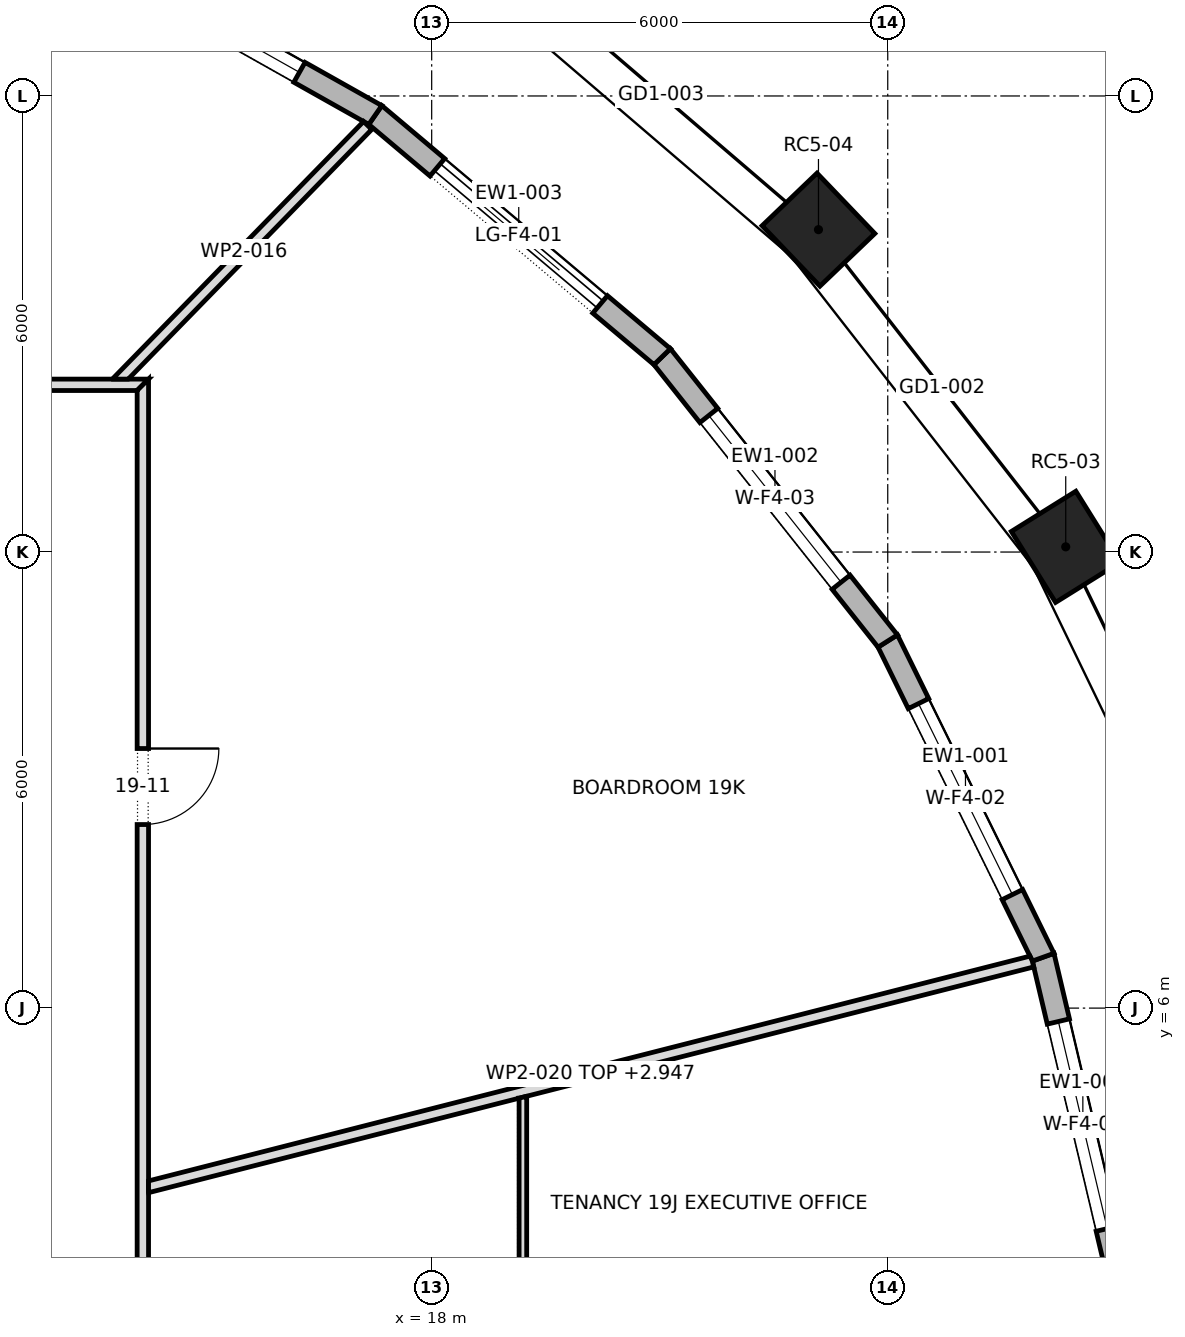
"""IFC4 building model, lengths in metres.
Left out: names, types, materials, properties, quantities, classifications, styles, units other than length and angle.
Written with IfcOpenShell. Run it as: python <this file> out.ifc"""

import sys

from ifc_helpers import new_model, si_unit, direction, frame, frame_2d, origin, origin_2d, place, context, subcontext, project, spatial, polyline, rectangle, outline, extrude, element, fill, save


model = new_model("IFC4")
c1 = context("Model", 3, precision=1e-05, world=origin(), true_north=direction((0.0, 1.0)))
c2 = subcontext(c1, "Body", "Model", "MODEL_VIEW")
j1 = project(units=[si_unit("LENGTHUNIT", "METRE"), si_unit("PLANEANGLEUNIT", "RADIAN")], contexts=[c1])
p1 = place(None, origin())
s1 = spatial("IfcSite", under=j1, at=p1, CompositionType="ELEMENT")
p2 = place(p1, origin())
s2 = spatial("IfcBuilding", under=s1, at=p2, CompositionType="ELEMENT")
p3 = place(p2, frame((0.0, 0.0, 268.3)))
s3 = spatial("IfcBuildingStorey", under=s2, at=p3, CompositionType="ELEMENT", Elevation=268.3)
for number, where, z_axis, x_axis in (
    (1, (26.342, 12.069, 0.0), (0.0, 0.0, 1.0), (-0.529, 0.849, 0.0)),
    (2, (23.089, 16.241, 0.0), (0.0, 0.0, 1.0), (-0.692, 0.722, 0.0)),
):
    element("IfcColumn", number, at=place(p3, frame(where, z_axis=z_axis, x_axis=x_axis)), inside=s3, PredefinedType="COLUMN", context=c2, shape_type="SweptSolid", body=[
        extrude(rectangle(XDim=1.1, YDim=1.0, at=origin_2d()), origin(), (0.0, 0.0, 1.0), 4.0),
    ])
p4 = place(p3, frame((27.088, 2.252, 0.0), z_axis=(0.0, 0.0, 1.0), x_axis=(-0.22983372436, 0.973229910734, 0.0)))
e3 = element("IfcWall", 3, at=p4, inside=s3, PredefinedType="STANDARD", context=c2, shape_type="SweptSolid", body=[
    extrude(outline(polyline([(-0.018, -0.15), (4.556, -0.15), (4.522, 0.15), (0.018, 0.15), (-0.018, -0.15)])), origin(), (0.0, 0.0, 1.0), 3.7),
])
p5 = place(p4, frame((0.869, 0.0, 0.6)))
e4 = element("IfcOpeningElement", 4, at=p5, cuts=e3, PredefinedType="OPENING", context=c2, shape_type="SweptSolid", body=[
    extrude(rectangle(XDim=2.8, YDim=2.65, at=frame_2d((1.4, 1.325))), frame((0.0, 0.162, 0.0), z_axis=(0.0, -1.0, 0.0), x_axis=(1.0, 0.0, 0.0)), (0.0, 0.0, 1.0), 0.324),
])
p6 = place(p3, frame((26.045, 6.67, 0.0), z_axis=(0.0, 0.0, 1.0), x_axis=(-0.441261940724, 0.897378348117, 0.0)))
e5 = element("IfcWall", 5, at=p6, inside=s3, PredefinedType="STANDARD", context=c2, shape_type="SweptSolid", body=[
    extrude(outline(polyline([(-0.017, -0.15), (4.651, -0.15), (4.619, 0.15), (0.017, 0.15), (-0.017, -0.15)])), origin(), (0.0, 0.0, 1.0), 3.7),
])
p7 = place(p6, frame((0.917, 0.0, 0.6)))
e6 = element("IfcOpeningElement", 6, at=p7, cuts=e5, PredefinedType="OPENING", context=c2, shape_type="SweptSolid", body=[
    extrude(rectangle(XDim=2.8, YDim=2.65, at=frame_2d((1.4, 1.325))), frame((0.0, 0.162, 0.0), z_axis=(0.0, -1.0, 0.0), x_axis=(1.0, 0.0, 0.0)), (0.0, 0.0, 1.0), 0.324),
])
p8 = place(p3, frame((24.0, 10.829, 0.0), z_axis=(0.0, 0.0, 1.0), x_axis=(-0.621434755851, 0.783465917715, 0.0)))
e7 = element("IfcWall", 7, at=p8, inside=s3, PredefinedType="STANDARD", context=c2, shape_type="SweptSolid", body=[
    extrude(outline(polyline([(-0.016, -0.15), (4.79, -0.15), (4.76, 0.15), (0.016, 0.15), (-0.016, -0.15)])), origin(), (0.0, 0.0, 1.0), 3.7),
])
p9 = place(p8, frame((0.987, 0.0, 0.6)))
e8 = element("IfcOpeningElement", 8, at=p9, cuts=e7, PredefinedType="OPENING", context=c2, shape_type="SweptSolid", body=[
    extrude(rectangle(XDim=2.8, YDim=2.65, at=frame_2d((1.4, 1.325))), frame((0.0, 0.162, 0.0), z_axis=(0.0, -1.0, 0.0), x_axis=(1.0, 0.0, 0.0)), (0.0, 0.0, 1.0), 0.324),
])
p10 = place(p3, frame((21.032, 14.57, 0.0), z_axis=(0.0, 0.0, 1.0), x_axis=(-0.764832940795, 0.644228664897, 0.0)))
e9 = element("IfcWall", 9, at=p10, inside=s3, PredefinedType="STANDARD", context=c2, shape_type="SweptSolid", body=[
    extrude(outline(polyline([(-0.015, -0.15), (4.949, -0.15), (4.921, 0.15), (0.015, 0.15), (-0.015, -0.15)])), origin(), (0.0, 0.0, 1.0), 3.7),
])
p11 = place(p10, frame((1.068, 0.0, 0.0)))
e10 = element("IfcOpeningElement", 10, at=p11, cuts=e9, PredefinedType="OPENING", context=c2, shape_type="SweptSolid", body=[
    extrude(rectangle(XDim=2.8, YDim=3.25, at=frame_2d((1.4, 1.625))), frame((0.0, 0.162, 0.0), z_axis=(0.0, -1.0, 0.0), x_axis=(1.0, 0.0, 0.0)), (0.0, 0.0, 1.0), 0.324),
])
p12 = place(p3, frame((17.258, 17.75, 0.0), z_axis=(0.0, 0.0, 1.0), x_axis=(-0.871433320402, 0.490513983585, 0.0)))
e11 = element("IfcWall", 11, at=p12, inside=s3, PredefinedType="STANDARD", context=c2, shape_type="SweptSolid", body=[
    extrude(outline(polyline([(-0.014, -0.15), (5.104, -0.15), (5.077, 0.15), (0.014, 0.15), (-0.014, -0.15)])), origin(), (0.0, 0.0, 1.0), 3.7),
])
p13 = place(p12, frame((1.145, 0.0, 0.6)))
e12 = element("IfcOpeningElement", 12, at=p13, cuts=e11, PredefinedType="OPENING", context=c2, shape_type="SweptSolid", body=[
    extrude(rectangle(XDim=2.8, YDim=2.65, at=frame_2d((1.4, 1.325))), frame((0.0, 0.162, 0.0), z_axis=(0.0, -1.0, 0.0), x_axis=(1.0, 0.0, 0.0)), (0.0, 0.0, 1.0), 0.324),
])
p14 = place(p3, frame((-14.275, 14.2, 0.0), z_axis=(0.0, 0.0, 1.0), x_axis=(1.0, 0.0, 0.0)))
e13 = element("IfcWall", 13, at=p14, inside=s3, PredefinedType="PARTITIONING", context=c2, shape_type="SweptSolid", body=[
    extrude(outline(polyline([(0.15, -0.075), (2.033, -0.075), (3.917, -0.075), (5.8, -0.075), (7.683, -0.075), (9.567, -0.075), (11.45, -0.075), (13.333, -0.075), (15.217, -0.075), (17.1, -0.075), (18.983, -0.075), (20.866, -0.075), (22.75, -0.075), (24.633, -0.075), (26.517, -0.075), (28.4, -0.075), (28.55, 0.075), (28.55, 0.075), (26.646, 0.075), (24.743, 0.075), (22.84, 0.075), (20.937, 0.075), (19.033, 0.075), (17.13, 0.075), (15.227, 0.075), (13.323, 0.075), (11.42, 0.075), (9.517, 0.075), (7.613, 0.075), (5.71, 0.075), (3.807, 0.075), (1.903, 0.075), (0.0, 0.075), (0.15, -0.075)])), origin(), (0.0, 0.0, 1.0), 3.7),
])
p15 = place(p14, frame((5.845, 0.0, 0.0)))
e14 = element("IfcOpeningElement", 14, at=p15, cuts=e13, PredefinedType="OPENING", context=c2, shape_type="SweptSolid", body=[
    extrude(rectangle(XDim=1.0, YDim=2.1, at=frame_2d((0.5, 1.05))), frame((0.0, 0.087, 0.0), z_axis=(0.0, -1.0, 0.0), x_axis=(1.0, 0.0, 0.0)), (0.0, 0.0, 1.0), 0.174),
])
p16 = place(p14, frame((19.86, 0.0, 0.0)))
e15 = element("IfcOpeningElement", 15, at=p16, cuts=e13, PredefinedType="OPENING", context=c2, shape_type="SweptSolid", body=[
    extrude(rectangle(XDim=1.0, YDim=2.1, at=frame_2d((0.5, 1.05))), frame((0.0, 0.087, 0.0), z_axis=(0.0, -1.0, 0.0), x_axis=(1.0, 0.0, 0.0)), (0.0, 0.0, 1.0), 0.174),
])
p17 = place(p3, frame((13.852, 14.223, 0.0), z_axis=(0.0, 0.0, 1.0), x_axis=(0.69820654799, 0.715896372629, 0.0)))
e16 = element("IfcWall", 16, at=p17, inside=s3, PredefinedType="PARTITIONING", context=c2, shape_type="SweptSolid", body=[
    extrude(outline(polyline([(4.734, -0.075), (4.734, 0.075), (4.734, 0.075), (3.156, 0.075), (1.578, 0.075), (0.0, 0.075), (0.0, 0.075), (0.146, -0.075), (1.675, -0.075), (3.205, -0.075), (4.734, -0.075)])), origin(), (0.0, 0.0, 1.0), 3.7),
])
p18 = place(p3, frame((14.2, -14.275, 0.0), z_axis=(0.0, 0.0, 1.0), x_axis=(0.0, 1.0, 0.0)))
e17 = element("IfcWall", 17, at=p18, inside=s3, PredefinedType="PARTITIONING", context=c2, shape_type="SweptSolid", body=[
    extrude(outline(polyline([(28.55, -0.075), (28.55, -0.075), (28.4, 0.075), (26.517, 0.075), (24.633, 0.075), (22.75, 0.075), (20.866, 0.075), (18.983, 0.075), (17.1, 0.075), (15.217, 0.075), (13.333, 0.075), (11.45, 0.075), (9.567, 0.075), (7.683, 0.075), (5.8, 0.075), (3.917, 0.075), (2.033, 0.075), (0.15, 0.075), (0.0, -0.075), (1.903, -0.075), (3.807, -0.075), (5.71, -0.075), (7.613, -0.075), (9.517, -0.075), (11.42, -0.075), (13.323, -0.075), (15.227, -0.075), (17.13, -0.075), (19.033, -0.075), (20.937, -0.075), (22.84, -0.075), (24.743, -0.075), (26.646, -0.075), (28.55, -0.075)])), origin(), (0.0, 0.0, 1.0), 3.7),
])
p19 = place(p18, frame((3.48, 0.0, 0.0)))
e18 = element("IfcOpeningElement", 18, at=p19, cuts=e17, PredefinedType="OPENING", context=c2, shape_type="SweptSolid", body=[
    extrude(rectangle(XDim=1.0, YDim=2.1, at=frame_2d((0.5, 1.05))), frame((0.0, 0.087, 0.0), z_axis=(0.0, -1.0, 0.0), x_axis=(1.0, 0.0, 0.0)), (0.0, 0.0, 1.0), 0.174),
])
p20 = place(p18, frame((9.99, 0.0, 0.0)))
e19 = element("IfcOpeningElement", 19, at=p20, cuts=e17, PredefinedType="OPENING", context=c2, shape_type="SweptSolid", body=[
    extrude(rectangle(XDim=1.0, YDim=2.1, at=frame_2d((0.5, 1.05))), frame((0.0, 0.087, 0.0), z_axis=(0.0, -1.0, 0.0), x_axis=(1.0, 0.0, 0.0)), (0.0, 0.0, 1.0), 0.174),
])
p21 = place(p18, frame((15.0, 0.0, 0.0)))
e20 = element("IfcOpeningElement", 20, at=p21, cuts=e17, PredefinedType="OPENING", context=c2, shape_type="SweptSolid", body=[
    extrude(rectangle(XDim=1.0, YDim=2.1, at=frame_2d((0.5, 1.05))), frame((0.0, 0.087, 0.0), z_axis=(0.0, -1.0, 0.0), x_axis=(1.0, 0.0, 0.0)), (0.0, 0.0, 1.0), 0.174),
])
p22 = place(p18, frame((22.69, 0.0, 0.0)))
e21 = element("IfcOpeningElement", 21, at=p22, cuts=e17, PredefinedType="OPENING", context=c2, shape_type="SweptSolid", body=[
    extrude(rectangle(XDim=1.0, YDim=2.1, at=frame_2d((0.5, 1.05))), frame((0.0, 0.087, 0.0), z_axis=(0.0, -1.0, 0.0), x_axis=(1.0, 0.0, 0.0)), (0.0, 0.0, 1.0), 0.174),
])
p23 = place(p3, frame((14.257, 3.645, 0.0), z_axis=(0.0, 0.0, 1.0), x_axis=(0.968990601513, 0.247097580277, 0.0)))
e22 = element("IfcWall", 22, at=p23, inside=s3, PredefinedType="PARTITIONING", context=c2, shape_type="SweptSolid", body=[
    extrude(outline(polyline([(12.019, -0.075), (12.019, 0.011), (12.005, 0.075), (10.011, 0.075), (8.016, 0.075), (6.022, 0.075), (4.027, 0.075), (2.033, 0.075), (0.038, 0.075), (0.0, -0.074), (0.0, -0.075), (1.717, -0.075), (3.434, -0.075), (5.151, -0.075), (6.868, -0.075), (8.585, -0.075), (10.302, -0.075), (12.019, -0.075)])), origin(), (0.0, 0.0, 1.0), 2.947),
])
p24 = place(p3, frame((19.2, 4.84, 0.0), z_axis=(0.0, 0.0, 1.0), x_axis=(0.0, -1.0, 0.0)))
e23 = element("IfcWall", 23, at=p24, inside=s3, PredefinedType="PARTITIONING", context=c2, shape_type="SweptSolid", body=[
    extrude(outline(polyline([(0.025, -0.05), (1.607, -0.05), (3.19, -0.05), (4.772, -0.05), (6.355, -0.05), (6.363, 0.045), (6.363, 0.05), (4.772, 0.05), (3.181, 0.05), (1.591, 0.05), (0.0, 0.05), (0.0, 0.049), (0.025, -0.05)])), origin(), (0.0, 0.0, 1.0), 3.7),
])
p25 = place(p24, frame((2.73, 0.0, 0.0)))
e24 = element("IfcOpeningElement", 24, at=p25, cuts=e23, PredefinedType="OPENING", context=c2, shape_type="SweptSolid", body=[
    extrude(rectangle(XDim=0.9, YDim=2.1, at=frame_2d((0.45, 1.05))), frame((0.0, 0.062, 0.0), z_axis=(0.0, -1.0, 0.0), x_axis=(1.0, 0.0, 0.0)), (0.0, 0.0, 1.0), 0.124),
])
p26 = place(p5, origin())
e25 = element("IfcWindow", 25, at=p26, inside=s3, PartitioningType="DOUBLE_PANEL_VERTICAL", PredefinedType="WINDOW", context=c2, shape_type="SweptSolid", body=[
    extrude(rectangle(XDim=2.8, YDim=2.65, at=frame_2d((1.4, 1.325))), frame((0.0, 0.03, 0.0), z_axis=(0.0, -1.0, 0.0), x_axis=(1.0, 0.0, 0.0)), (0.0, 0.0, 1.0), 0.06),
])
fill(e4, e25)
p27 = place(p7, origin())
e26 = element("IfcWindow", 26, at=p27, inside=s3, PartitioningType="DOUBLE_PANEL_VERTICAL", PredefinedType="WINDOW", context=c2, shape_type="SweptSolid", body=[
    extrude(rectangle(XDim=2.8, YDim=2.65, at=frame_2d((1.4, 1.325))), frame((0.0, 0.03, 0.0), z_axis=(0.0, -1.0, 0.0), x_axis=(1.0, 0.0, 0.0)), (0.0, 0.0, 1.0), 0.06),
])
fill(e6, e26)
p28 = place(p9, origin())
e27 = element("IfcWindow", 27, at=p28, inside=s3, PartitioningType="DOUBLE_PANEL_VERTICAL", PredefinedType="WINDOW", context=c2, shape_type="SweptSolid", body=[
    extrude(rectangle(XDim=2.8, YDim=2.65, at=frame_2d((1.4, 1.325))), frame((0.0, 0.03, 0.0), z_axis=(0.0, -1.0, 0.0), x_axis=(1.0, 0.0, 0.0)), (0.0, 0.0, 1.0), 0.06),
])
fill(e8, e27)
p29 = place(p11, origin())
e28 = element("IfcDoor", 28, at=p29, inside=s3, OperationType="DOUBLE_DOOR_SLIDING", PredefinedType="DOOR", context=c2, shape_type="SweptSolid", body=[
    extrude(rectangle(XDim=2.8, YDim=3.25, at=frame_2d((1.4, 1.625))), frame((0.0, 0.025, 0.0), z_axis=(0.0, -1.0, 0.0), x_axis=(1.0, 0.0, 0.0)), (0.0, 0.0, 1.0), 0.05),
])
fill(e10, e28)
p30 = place(p13, origin())
e29 = element("IfcWindow", 29, at=p30, inside=s3, PartitioningType="DOUBLE_PANEL_VERTICAL", PredefinedType="WINDOW", context=c2, shape_type="SweptSolid", body=[
    extrude(rectangle(XDim=2.8, YDim=2.65, at=frame_2d((1.4, 1.325))), frame((0.0, 0.03, 0.0), z_axis=(0.0, -1.0, 0.0), x_axis=(1.0, 0.0, 0.0)), (0.0, 0.0, 1.0), 0.06),
])
fill(e12, e29)
p31 = place(p22, frame((1.0, 0.0, 0.0), z_axis=(0.0, 0.0, 1.0), x_axis=(-1.0, 0.0, 0.0)))
e30 = element("IfcDoor", 30, at=p31, inside=s3, OperationType="SINGLE_SWING_RIGHT", PredefinedType="DOOR", context=c2, shape_type="SweptSolid", body=[
    extrude(rectangle(XDim=1.0, YDim=2.1, at=frame_2d((0.5, 1.05))), frame((0.0, 0.025, 0.0), z_axis=(0.0, -1.0, 0.0), x_axis=(1.0, 0.0, 0.0)), (0.0, 0.0, 1.0), 0.05),
])
fill(e21, e30)
save(model, sys.argv[1])
